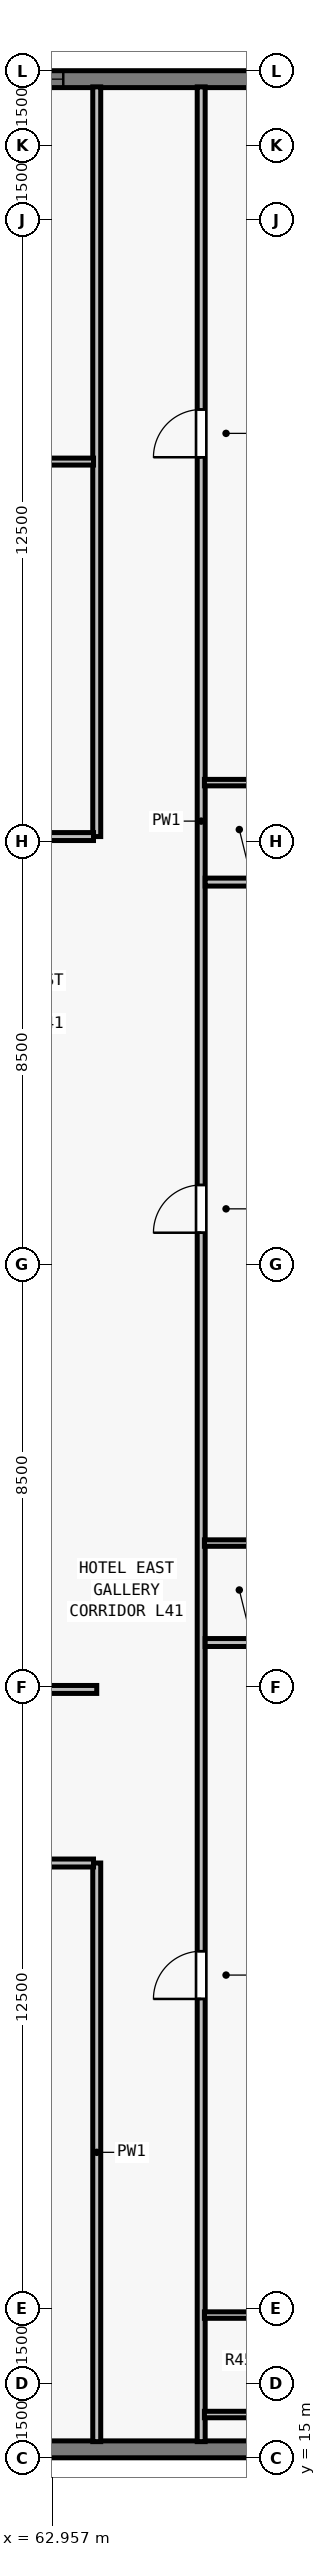
"""IFC4 building model, lengths in metres.
Left out: names, types, materials, properties, quantities, classifications, styles, units other than length and angle.
Written with IfcOpenShell. Run it as: python <this file> out.ifc"""

import sys

from ifc_helpers import new_model, si_unit, direction, frame, frame_2d, origin, place, context, subcontext, project, spatial, rectangle, extrude, element, fill, save


model = new_model("IFC4")
c1 = context("Model", 3, precision=1e-05, world=origin(), true_north=direction((0.0, 1.0)))
c2 = subcontext(c1, "Body", "Model", "MODEL_VIEW")
j1 = project(units=[si_unit("LENGTHUNIT", "METRE"), si_unit("PLANEANGLEUNIT", "RADIAN")], contexts=[c1])
p1 = place(None, origin())
s1 = spatial("IfcSite", under=j1, at=p1, CompositionType="ELEMENT")
p2 = place(p1, origin())
s2 = spatial("IfcBuilding", under=s1, at=p2, CompositionType="ELEMENT")
p3 = place(p2, frame((0.0, 0.0, 151.5)))
s3 = spatial("IfcBuildingStorey", under=s2, at=p3, CompositionType="ELEMENT", Elevation=151.5)
p4 = place(p3, frame((32.0, 62.83, 0.0), z_axis=(0.0, 0.0, 1.0), x_axis=(1.0, 0.0, 0.0)))
e1 = element("IfcWall", 1, at=p4, inside=s3, PredefinedType="SOLIDWALL", context=c2, shape_type="SweptSolid", body=[
    extrude(rectangle(XDim=39.682, YDim=0.34, at=frame_2d((19.841, 0.0))), origin(), (0.0, 0.0, 1.0), 3.28),
])
p5 = place(p4, frame((4.752, 0.0, 0.8)))
e2 = element("IfcOpeningElement", 2, at=p5, cuts=e1, PredefinedType="OPENING", context=c2, shape_type="SweptSolid", body=[
    extrude(rectangle(XDim=1.75, YDim=1.66, at=frame_2d((0.875, 0.83))), frame((0.0, 0.18, 0.0), z_axis=(0.0, -1.0, 0.0), x_axis=(1.0, 0.0, 0.0)), (0.0, 0.0, 1.0), 0.36),
])
p6 = place(p4, frame((11.859, 0.0, 0.8)))
e3 = element("IfcOpeningElement", 3, at=p6, cuts=e1, PredefinedType="OPENING", context=c2, shape_type="SweptSolid", body=[
    extrude(rectangle(XDim=1.75, YDim=1.66, at=frame_2d((0.875, 0.83))), frame((0.0, 0.18, 0.0), z_axis=(0.0, -1.0, 0.0), x_axis=(1.0, 0.0, 0.0)), (0.0, 0.0, 1.0), 0.36),
])
p7 = place(p4, frame((16.062, 0.0, 0.8)))
e4 = element("IfcOpeningElement", 4, at=p7, cuts=e1, PredefinedType="OPENING", context=c2, shape_type="SweptSolid", body=[
    extrude(rectangle(XDim=1.35, YDim=1.66, at=frame_2d((0.675, 0.83))), frame((0.0, 0.18, 0.0), z_axis=(0.0, -1.0, 0.0), x_axis=(1.0, 0.0, 0.0)), (0.0, 0.0, 1.0), 0.36),
])
p8 = place(p4, frame((17.716, 0.0, 0.8)))
e5 = element("IfcOpeningElement", 5, at=p8, cuts=e1, PredefinedType="OPENING", context=c2, shape_type="SweptSolid", body=[
    extrude(rectangle(XDim=1.75, YDim=1.66, at=frame_2d((0.875, 0.83))), frame((0.0, 0.18, 0.0), z_axis=(0.0, -1.0, 0.0), x_axis=(1.0, 0.0, 0.0)), (0.0, 0.0, 1.0), 0.36),
])
p9 = place(p4, frame((22.719, 0.0, 0.8)))
e6 = element("IfcOpeningElement", 6, at=p9, cuts=e1, PredefinedType="OPENING", context=c2, shape_type="SweptSolid", body=[
    extrude(rectangle(XDim=1.35, YDim=1.66, at=frame_2d((0.675, 0.83))), frame((0.0, 0.18, 0.0), z_axis=(0.0, -1.0, 0.0), x_axis=(1.0, 0.0, 0.0)), (0.0, 0.0, 1.0), 0.36),
])
p10 = place(p4, frame((26.073, 0.0, 0.8)))
e7 = element("IfcOpeningElement", 7, at=p10, cuts=e1, PredefinedType="OPENING", context=c2, shape_type="SweptSolid", body=[
    extrude(rectangle(XDim=1.75, YDim=1.66, at=frame_2d((0.875, 0.83))), frame((0.0, 0.18, 0.0), z_axis=(0.0, -1.0, 0.0), x_axis=(1.0, 0.0, 0.0)), (0.0, 0.0, 1.0), 0.36),
])
p11 = place(p4, frame((29.827, 0.0, 0.8)))
e8 = element("IfcOpeningElement", 8, at=p11, cuts=e1, PredefinedType="OPENING", context=c2, shape_type="SweptSolid", body=[
    extrude(rectangle(XDim=1.35, YDim=1.66, at=frame_2d((0.675, 0.83))), frame((0.0, 0.18, 0.0), z_axis=(0.0, -1.0, 0.0), x_axis=(1.0, 0.0, 0.0)), (0.0, 0.0, 1.0), 0.36),
])
p12 = place(p3, frame((72.0, 15.17, 0.0), z_axis=(0.0, 0.0, 1.0), x_axis=(-1.0, 0.0, 0.0)))
e9 = element("IfcWall", 9, at=p12, inside=s3, PredefinedType="SOLIDWALL", context=c2, shape_type="SweptSolid", body=[
    extrude(rectangle(XDim=17.082, YDim=0.34, at=frame_2d((8.541, 0.0))), origin(), (0.0, 0.0, 1.0), 3.28),
])
p13 = place(p12, frame((9.166, 0.0, 0.8)))
e10 = element("IfcOpeningElement", 10, at=p13, cuts=e9, PredefinedType="OPENING", context=c2, shape_type="SweptSolid", body=[
    extrude(rectangle(XDim=1.35, YDim=1.66, at=frame_2d((0.675, 0.83))), frame((0.0, 0.18, 0.0), z_axis=(0.0, -1.0, 0.0), x_axis=(1.0, 0.0, 0.0)), (0.0, 0.0, 1.0), 0.36),
])
p14 = place(p12, frame((12.51, 0.0, 0.8)))
e11 = element("IfcOpeningElement", 11, at=p14, cuts=e9, PredefinedType="OPENING", context=c2, shape_type="SweptSolid", body=[
    extrude(rectangle(XDim=1.75, YDim=1.66, at=frame_2d((0.875, 0.83))), frame((0.0, 0.18, 0.0), z_axis=(0.0, -1.0, 0.0), x_axis=(1.0, 0.0, 0.0)), (0.0, 0.0, 1.0), 0.36),
])
p15 = place(p3, frame((65.95, 15.325, 0.0), z_axis=(0.0, 0.0, 1.0), x_axis=(0.0, 1.0, 0.0)))
e12 = element("IfcWall", 12, at=p15, inside=s3, PredefinedType="PARTITIONING", context=c2, shape_type="SweptSolid", body=[
    extrude(rectangle(XDim=47.35, YDim=0.16, at=frame_2d((23.675, 0.0))), origin(), (0.0, 0.0, 1.0), 2.555),
])
p16 = place(p15, frame((8.902, 0.0, 0.0)))
e13 = element("IfcOpeningElement", 13, at=p16, cuts=e12, PredefinedType="OPENING", context=c2, shape_type="SweptSolid", body=[
    extrude(rectangle(XDim=0.96, YDim=2.15, at=frame_2d((0.48, 1.075))), frame((0.0, 0.09, 0.0), z_axis=(0.0, -1.0, 0.0), x_axis=(1.0, 0.0, 0.0)), (0.0, 0.0, 1.0), 0.18),
])
p17 = place(p15, frame((24.309, 0.0, 0.0)))
e14 = element("IfcOpeningElement", 14, at=p17, cuts=e12, PredefinedType="OPENING", context=c2, shape_type="SweptSolid", body=[
    extrude(rectangle(XDim=0.96, YDim=2.15, at=frame_2d((0.48, 1.075))), frame((0.0, 0.09, 0.0), z_axis=(0.0, -1.0, 0.0), x_axis=(1.0, 0.0, 0.0)), (0.0, 0.0, 1.0), 0.18),
])
p18 = place(p15, frame((39.902, 0.0, 0.0)))
e15 = element("IfcOpeningElement", 15, at=p18, cuts=e12, PredefinedType="OPENING", context=c2, shape_type="SweptSolid", body=[
    extrude(rectangle(XDim=0.96, YDim=2.15, at=frame_2d((0.48, 1.075))), frame((0.0, 0.09, 0.0), z_axis=(0.0, -1.0, 0.0), x_axis=(1.0, 0.0, 0.0)), (0.0, 0.0, 1.0), 0.18),
])
p19 = place(p3, frame((63.85, 15.325, 0.0), z_axis=(0.0, 0.0, 1.0), x_axis=(0.0, 1.0, 0.0)))
e16 = element("IfcWall", 16, at=p19, inside=s3, PredefinedType="PARTITIONING", context=c2, shape_type="SweptSolid", body=[
    extrude(rectangle(XDim=11.635, YDim=0.16, at=frame_2d((5.817, 0.0))), origin(), (0.0, 0.0, 1.0), 2.555),
])
p20 = place(p3, frame((63.85, 47.6, 0.0), z_axis=(0.0, 0.0, 1.0), x_axis=(0.0, 1.0, 0.0)))
e17 = element("IfcWall", 17, at=p20, inside=s3, PredefinedType="PARTITIONING", context=c2, shape_type="SweptSolid", body=[
    extrude(rectangle(XDim=15.075, YDim=0.16, at=frame_2d((7.538, 0.0))), origin(), (0.0, 0.0, 1.0), 2.555),
])
p21 = place(p3, frame((60.765, 30.45, 0.0), z_axis=(0.0, 0.0, 1.0), x_axis=(1.0, 0.0, 0.0)))
e18 = element("IfcWall", 18, at=p21, inside=s3, PredefinedType="PARTITIONING", context=c2, shape_type="SweptSolid", body=[
    extrude(rectangle(XDim=3.085, YDim=0.16, at=frame_2d((1.542, 0.0))), origin(), (0.0, 0.0, 1.0), 3.28),
])
p22 = place(p3, frame((60.765, 47.6, 0.0), z_axis=(0.0, 0.0, 1.0), x_axis=(1.0, 0.0, 0.0)))
e19 = element("IfcWall", 19, at=p22, inside=s3, PredefinedType="PARTITIONING", context=c2, shape_type="SweptSolid", body=[
    extrude(rectangle(XDim=3.02, YDim=0.16, at=frame_2d((1.51, 0.0))), origin(), (0.0, 0.0, 1.0), 3.28),
])
p23 = place(p3, frame((41.715, 26.96, 0.0), z_axis=(0.0, 0.0, 1.0), x_axis=(1.0, 0.0, 0.0)))
e20 = element("IfcWall", 20, at=p23, inside=s3, PredefinedType="PARTITIONING", context=c2, shape_type="SweptSolid", body=[
    extrude(rectangle(XDim=22.07, YDim=0.16, at=frame_2d((11.035, 0.0))), origin(), (0.0, 0.0, 1.0), 3.28),
])
p24 = place(p23, frame((6.15, 0.0, 0.0)))
e21 = element("IfcOpeningElement", 21, at=p24, cuts=e20, PredefinedType="OPENING", context=c2, shape_type="SweptSolid", body=[
    extrude(rectangle(XDim=0.96, YDim=2.15, at=frame_2d((0.48, 1.075))), frame((0.0, 0.09, 0.0), z_axis=(0.0, -1.0, 0.0), x_axis=(1.0, 0.0, 0.0)), (0.0, 0.0, 1.0), 0.18),
])
p25 = place(p23, frame((16.945, 0.0, 0.0)))
e22 = element("IfcOpeningElement", 22, at=p25, cuts=e20, PredefinedType="OPENING", context=c2, shape_type="SweptSolid", body=[
    extrude(rectangle(XDim=0.96, YDim=2.15, at=frame_2d((0.48, 1.075))), frame((0.0, 0.09, 0.0), z_axis=(0.0, -1.0, 0.0), x_axis=(1.0, 0.0, 0.0)), (0.0, 0.0, 1.0), 0.18),
])
p26 = place(p3, frame((41.715, 55.14, 0.0), z_axis=(0.0, 0.0, 1.0), x_axis=(1.0, 0.0, 0.0)))
e23 = element("IfcWall", 23, at=p26, inside=s3, PredefinedType="PARTITIONING", context=c2, shape_type="SweptSolid", body=[
    extrude(rectangle(XDim=22.07, YDim=0.14, at=frame_2d((11.035, 0.0))), origin(), (0.0, 0.0, 1.0), 3.28),
])
p27 = place(p26, frame((3.435, 0.0, 0.0)))
e24 = element("IfcOpeningElement", 24, at=p27, cuts=e23, PredefinedType="OPENING", context=c2, shape_type="SweptSolid", body=[
    extrude(rectangle(XDim=0.92, YDim=2.12, at=frame_2d((0.46, 1.06))), frame((0.0, 0.08, 0.0), z_axis=(0.0, -1.0, 0.0), x_axis=(1.0, 0.0, 0.0)), (0.0, 0.0, 1.0), 0.16),
])
p28 = place(p26, frame((14.435, 0.0, 0.0)))
e25 = element("IfcOpeningElement", 25, at=p28, cuts=e23, PredefinedType="OPENING", context=c2, shape_type="SweptSolid", body=[
    extrude(rectangle(XDim=0.92, YDim=2.12, at=frame_2d((0.46, 1.06))), frame((0.0, 0.08, 0.0), z_axis=(0.0, -1.0, 0.0), x_axis=(1.0, 0.0, 0.0)), (0.0, 0.0, 1.0), 0.16),
])
for number, where, z_axis, x_axis in (
    (26, (66.015, 15.87, 0.0), (0.0, 0.0, 1.0), (1.0, 0.0, 0.0)),
    (27, (66.015, 17.87, 0.0), (0.0, 0.0, 1.0), (1.0, 0.0, 0.0)),
):
    element("IfcWall", number, at=place(p3, frame(where, z_axis=z_axis, x_axis=x_axis)), inside=s3, PredefinedType="PLUMBINGWALL", context=c2, shape_type="SweptSolid", body=[
        extrude(rectangle(XDim=2.315, YDim=0.13, at=frame_2d((1.158, 0.0))), origin(), (0.0, 0.0, 1.0), 3.28),
    ])
p29 = place(p3, frame((66.03, 31.394, 0.0), z_axis=(0.0, 0.0, 1.0), x_axis=(1.0, 0.0, 0.0)))
e28 = element("IfcWall", 28, at=p29, inside=s3, PredefinedType="PARTITIONING", context=c2, shape_type="SweptSolid", body=[
    extrude(rectangle(XDim=9.645, YDim=0.16, at=frame_2d((4.823, 0.0))), origin(), (0.0, 0.0, 1.0), 3.28),
])
p30 = place(p3, frame((66.015, 33.394, 0.0), z_axis=(0.0, 0.0, 1.0), x_axis=(1.0, 0.0, 0.0)))
e29 = element("IfcWall", 29, at=p30, inside=s3, PredefinedType="PLUMBINGWALL", context=c2, shape_type="SweptSolid", body=[
    extrude(rectangle(XDim=2.315, YDim=0.13, at=frame_2d((1.158, 0.0))), origin(), (0.0, 0.0, 1.0), 3.28),
])
p31 = place(p3, frame((66.03, 46.685, 0.0), z_axis=(0.0, 0.0, 1.0), x_axis=(1.0, 0.0, 0.0)))
e30 = element("IfcWall", 30, at=p31, inside=s3, PredefinedType="PARTITIONING", context=c2, shape_type="SweptSolid", body=[
    extrude(rectangle(XDim=9.645, YDim=0.16, at=frame_2d((4.823, 0.0))), origin(), (0.0, 0.0, 1.0), 3.28),
])
p32 = place(p3, frame((66.015, 48.685, 0.0), z_axis=(0.0, 0.0, 1.0), x_axis=(1.0, 0.0, 0.0)))
e31 = element("IfcWall", 31, at=p32, inside=s3, PredefinedType="PLUMBINGWALL", context=c2, shape_type="SweptSolid", body=[
    extrude(rectangle(XDim=2.315, YDim=0.13, at=frame_2d((1.158, 0.0))), origin(), (0.0, 0.0, 1.0), 3.28),
])
p33 = place(p11, origin())
e32 = element("IfcWindow", 32, at=p33, inside=s3, PartitioningType="SINGLE_PANEL", PredefinedType="WINDOW", context=c2, shape_type="SweptSolid", body=[
    extrude(rectangle(XDim=1.35, YDim=1.66, at=frame_2d((0.675, 0.83))), frame((0.0, -0.05, 0.0), z_axis=(0.0, -1.0, 0.0), x_axis=(1.0, 0.0, 0.0)), (0.0, 0.0, 1.0), 0.06),
])
fill(e8, e32)
p34 = place(p16, origin())
e33 = element("IfcDoor", 33, at=p34, inside=s3, OperationType="SINGLE_SWING_LEFT", PredefinedType="DOOR", context=c2, shape_type="SweptSolid", body=[
    extrude(rectangle(XDim=0.96, YDim=2.15, at=frame_2d((0.48, 1.075))), frame((0.0, 0.025, 0.0), z_axis=(0.0, -1.0, 0.0), x_axis=(1.0, 0.0, 0.0)), (0.0, 0.0, 1.0), 0.05),
])
fill(e13, e33)
p35 = place(p17, origin())
e34 = element("IfcDoor", 34, at=p35, inside=s3, OperationType="SINGLE_SWING_LEFT", PredefinedType="DOOR", context=c2, shape_type="SweptSolid", body=[
    extrude(rectangle(XDim=0.96, YDim=2.15, at=frame_2d((0.48, 1.075))), frame((0.0, 0.025, 0.0), z_axis=(0.0, -1.0, 0.0), x_axis=(1.0, 0.0, 0.0)), (0.0, 0.0, 1.0), 0.05),
])
fill(e14, e34)
p36 = place(p18, origin())
e35 = element("IfcDoor", 35, at=p36, inside=s3, OperationType="SINGLE_SWING_LEFT", PredefinedType="DOOR", context=c2, shape_type="SweptSolid", body=[
    extrude(rectangle(XDim=0.96, YDim=2.15, at=frame_2d((0.48, 1.075))), frame((0.0, 0.025, 0.0), z_axis=(0.0, -1.0, 0.0), x_axis=(1.0, 0.0, 0.0)), (0.0, 0.0, 1.0), 0.05),
])
fill(e15, e35)
save(model, sys.argv[1])
